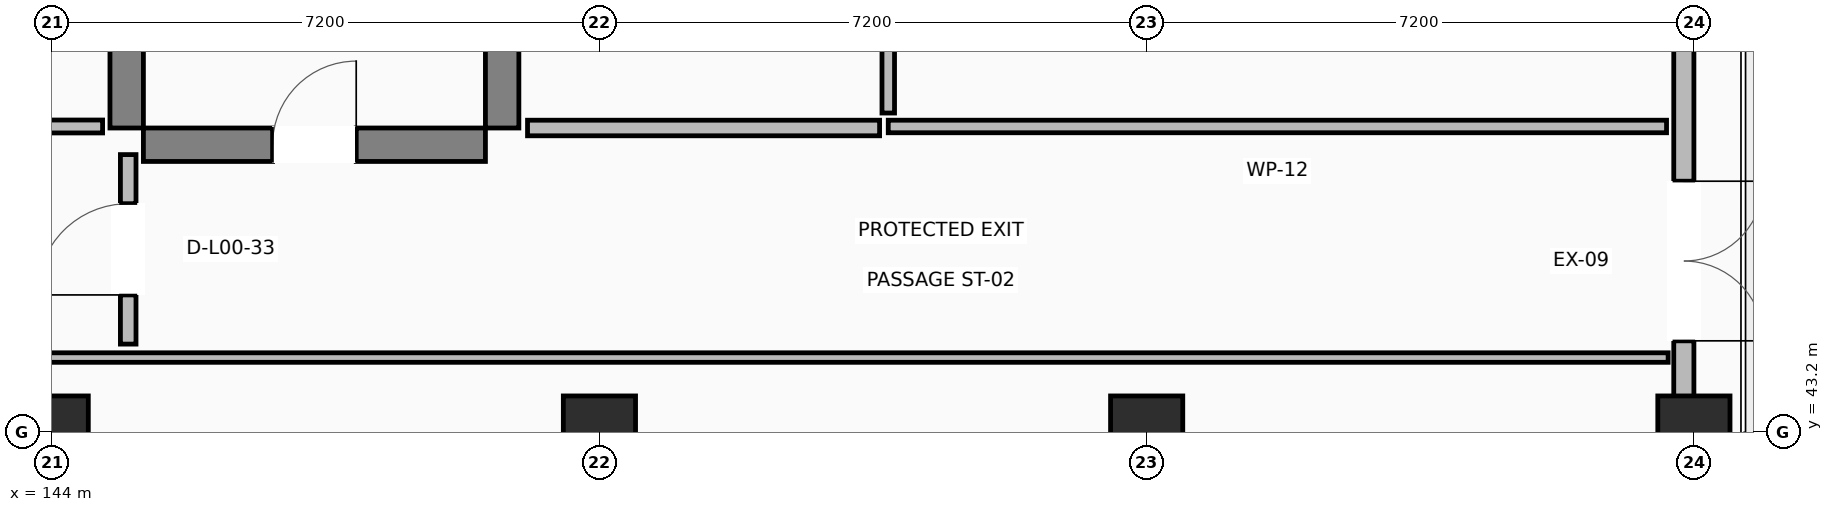
"""IFC4 building model, lengths in metres.
Left out: names, types, materials, properties, quantities, classifications, styles, units other than length and angle.
Written with IfcOpenShell. Run it as: python <this file> out.ifc"""

import sys

from ifc_helpers import new_model, si_unit, direction, frame, frame_2d, origin, origin_2d, place, context, subcontext, project, spatial, rectangle, extrude, element, fill, save


model = new_model("IFC4")
c1 = context("Model", 3, precision=1e-05, world=origin(), true_north=direction((0.0, 1.0)))
c2 = subcontext(c1, "Body", "Model", "MODEL_VIEW")
j1 = project(units=[si_unit("LENGTHUNIT", "METRE"), si_unit("PLANEANGLEUNIT", "RADIAN")], contexts=[c1])
p1 = place(None, origin())
s1 = spatial("IfcSite", under=j1, at=p1, CompositionType="ELEMENT")
p2 = place(p1, origin())
s2 = spatial("IfcBuilding", under=s1, at=p2, CompositionType="ELEMENT")
p3 = place(p2, origin())
s3 = spatial("IfcBuildingStorey", under=s2, at=p3, CompositionType="ELEMENT", Elevation=0.0)
for number, where, z_axis, x_axis in (
    (1, (144.0, 43.2, 0.0), (0.0, 0.0, 1.0), (1.0, 0.0, 0.0)),
    (2, (151.2, 43.2, 0.0), (0.0, 0.0, 1.0), (1.0, 0.0, 0.0)),
    (3, (158.4, 43.2, 0.0), (0.0, 0.0, 1.0), (1.0, 0.0, 0.0)),
    (4, (165.6, 43.2, 0.0), (0.0, 0.0, 1.0), (1.0, 0.0, 0.0)),
):
    element("IfcColumn", number, at=place(p3, frame(where, z_axis=z_axis, x_axis=x_axis)), inside=s3, PredefinedType="COLUMN", context=c2, shape_type="SweptSolid", body=[
        extrude(rectangle(XDim=0.95, YDim=0.95, at=origin_2d()), origin(), (0.0, 0.0, 1.0), 4.22),
    ])
p4 = place(p3, frame((145.2, 46.98, 0.0), z_axis=(0.0, 0.0, 1.0), x_axis=(1.0, 0.0, 0.0)))
e5 = element("IfcWall", 5, at=p4, inside=s3, PredefinedType="SHEAR", context=c2, shape_type="SweptSolid", body=[
    extrude(rectangle(XDim=4.5, YDim=0.44, at=frame_2d((2.25, 0.0))), origin(), (0.0, 0.0, 1.0), 4.22),
])
p5 = place(p4, frame((1.7, 0.0, 0.0)))
e6 = element("IfcOpeningElement", 6, at=p5, cuts=e5, PredefinedType="OPENING", context=c2, shape_type="SweptSolid", body=[
    extrude(rectangle(XDim=1.1, YDim=2.15, at=frame_2d((0.55, 1.075))), frame((0.0, 0.23, 0.0), z_axis=(0.0, -1.0, 0.0), x_axis=(1.0, 0.0, 0.0)), (0.0, 0.0, 1.0), 0.46),
])
for number, where, z_axis, x_axis in (
    (7, (144.98, 47.2, 0.0), (0.0, 0.0, 1.0), (0.0, 1.0, 0.0)),
    (8, (149.92, 47.2, 0.0), (0.0, 0.0, 1.0), (0.0, 1.0, 0.0)),
):
    element("IfcWall", number, at=place(p3, frame(where, z_axis=z_axis, x_axis=x_axis)), inside=s3, PredefinedType="SHEAR", context=c2, shape_type="SweptSolid", body=[
        extrude(rectangle(XDim=9.5, YDim=0.44, at=frame_2d((4.75, 0.0))), origin(), (0.0, 0.0, 1.0), 4.22),
    ])
p6 = place(p3, frame((165.468, 50.4, 0.0), z_axis=(0.0, 0.0, 1.0), x_axis=(0.0, -1.0, 0.0)))
e9 = element("IfcWall", 9, at=p6, inside=s3, PredefinedType="STANDARD", context=c2, shape_type="SweptSolid", body=[
    extrude(rectangle(XDim=7.2, YDim=0.265, at=frame_2d((3.6, 0.0))), origin(), (0.0, 0.0, 1.0), 2.6),
])
p7 = place(p6, frame((3.9, 0.0, 0.0)))
e10 = element("IfcOpeningElement", 10, at=p7, cuts=e9, PredefinedType="OPENING", context=c2, shape_type="SweptSolid", body=[
    extrude(rectangle(XDim=2.1, YDim=2.3, at=frame_2d((1.05, 1.15))), frame((0.0, 0.142, 0.0), z_axis=(0.0, -1.0, 0.0), x_axis=(1.0, 0.0, 0.0)), (0.0, 0.0, 1.0), 0.285),
])
p8 = place(p3, frame((165.458, 42.412, 0.0), z_axis=(0.0, 0.0, 1.0), x_axis=(0.0, 1.0, 0.0)))
e11 = element("IfcWall", 11, at=p8, inside=s3, PredefinedType="STANDARD", context=c2, shape_type="SweptSolid", body=[
    extrude(rectangle(XDim=0.788, YDim=0.285, at=frame_2d((0.394, 0.0))), origin(), (0.0, 0.0, 1.0), 2.6),
])
p9 = place(p3, frame((144.663, 47.22, 0.0), z_axis=(0.0, 0.0, 1.0), x_axis=(-1.0, 0.0, 0.0)))
e12 = element("IfcWall", 12, at=p9, inside=s3, PredefinedType="PARTITIONING", context=c2, shape_type="SweptSolid", body=[
    extrude(rectangle(XDim=10.863, YDim=0.17, at=frame_2d((5.432, 0.0))), origin(), (0.0, 0.0, 1.0), 2.6),
])
p10 = place(p9, frame((4.906, 0.0, 0.0)))
e13 = element("IfcOpeningElement", 13, at=p10, cuts=e12, PredefinedType="OPENING", context=c2, shape_type="SweptSolid", body=[
    extrude(rectangle(XDim=1.05, YDim=2.15, at=frame_2d((0.525, 1.075))), frame((0.0, 0.095, 0.0), z_axis=(0.0, -1.0, 0.0), x_axis=(1.0, 0.0, 0.0)), (0.0, 0.0, 1.0), 0.19),
])
p11 = place(p3, frame((165.24, 47.22, 0.0), z_axis=(0.0, 0.0, 1.0), x_axis=(-1.0, 0.0, 0.0)))
e14 = element("IfcWall", 14, at=p11, inside=s3, PredefinedType="PARTITIONING", context=c2, shape_type="SweptSolid", body=[
    extrude(rectangle(XDim=10.24, YDim=0.165, at=frame_2d((5.12, 0.0))), origin(), (0.0, 0.0, 1.0), 2.6),
])
p12 = place(p3, frame((155.0, 47.397, 0.0), z_axis=(0.0, 0.0, 1.0), x_axis=(0.0, 1.0, 0.0)))
e15 = element("IfcWall", 15, at=p12, inside=s3, PredefinedType="PARTITIONING", context=c2, shape_type="SweptSolid", body=[
    extrude(rectangle(XDim=10.021, YDim=0.165, at=frame_2d((5.01, 0.0))), origin(), (0.0, 0.0, 1.0), 2.6),
])
p13 = place(p12, frame((5.371, 0.0, 0.0)))
e16 = element("IfcOpeningElement", 16, at=p13, cuts=e15, PredefinedType="OPENING", context=c2, shape_type="SweptSolid", body=[
    extrude(rectangle(XDim=1.08, YDim=2.15, at=frame_2d((0.54, 1.075))), frame((0.0, 0.093, 0.0), z_axis=(0.0, -1.0, 0.0), x_axis=(1.0, 0.0, 0.0)), (0.0, 0.0, 1.0), 0.185),
])
p14 = place(p3, frame((119.62, 44.18, 0.0), z_axis=(0.0, 0.0, 1.0), x_axis=(1.0, 0.0, 0.0)))
e17 = element("IfcWall", 17, at=p14, inside=s3, PredefinedType="PARTITIONING", context=c2, shape_type="SweptSolid", body=[
    extrude(rectangle(XDim=45.641, YDim=0.125, at=frame_2d((22.82, 0.0))), origin(), (0.0, 0.0, 1.0), 2.6),
])
p15 = place(p14, frame((22.35, 0.0, 0.0)))
e18 = element("IfcOpeningElement", 18, at=p15, cuts=e17, PredefinedType="OPENING", context=c2, shape_type="SweptSolid", body=[
    extrude(rectangle(XDim=0.94, YDim=2.1, at=frame_2d((0.47, 1.05))), frame((0.0, 0.073, 0.0), z_axis=(0.0, -1.0, 0.0), x_axis=(1.0, 0.0, 0.0)), (0.0, 0.0, 1.0), 0.145),
])
p16 = place(p3, frame((145.0, 44.357, 0.0), z_axis=(0.0, 0.0, 1.0), x_axis=(0.0, 1.0, 0.0)))
e19 = element("IfcWall", 19, at=p16, inside=s3, PredefinedType="PARTITIONING", context=c2, shape_type="SweptSolid", body=[
    extrude(rectangle(XDim=2.493, YDim=0.205, at=frame_2d((1.247, 0.0))), origin(), (0.0, 0.0, 1.0), 2.6),
])
p17 = place(p16, frame((0.647, 0.0, 0.0)))
e20 = element("IfcOpeningElement", 20, at=p17, cuts=e19, PredefinedType="OPENING", context=c2, shape_type="SweptSolid", body=[
    extrude(rectangle(XDim=1.2, YDim=2.15, at=frame_2d((0.6, 1.075))), frame((0.0, 0.113, 0.0), z_axis=(0.0, -1.0, 0.0), x_axis=(1.0, 0.0, 0.0)), (0.0, 0.0, 1.0), 0.225),
])
p18 = place(p3, frame((150.254, 47.2, 0.0), z_axis=(0.0, 0.0, 1.0), x_axis=(1.0, 0.0, 0.0)))
e21 = element("IfcWall", 21, at=p18, inside=s3, PredefinedType="PARTITIONING", context=c2, shape_type="SweptSolid", body=[
    extrude(rectangle(XDim=4.632, YDim=0.205, at=frame_2d((2.316, 0.0))), origin(), (0.0, 0.0, 1.0), 2.6),
])
p19 = place(p7, origin())
e22 = element("IfcDoor", 22, at=p19, inside=s3, OperationType="DOUBLE_DOOR_SINGLE_SWING", PredefinedType="DOOR", context=c2, shape_type="SweptSolid", body=[
    extrude(rectangle(XDim=2.1, YDim=2.3, at=frame_2d((1.05, 1.15))), frame((0.0, 0.025, 0.0), z_axis=(0.0, -1.0, 0.0), x_axis=(1.0, 0.0, 0.0)), (0.0, 0.0, 1.0), 0.05),
])
fill(e10, e22)
p20 = place(p5, origin())
e23 = element("IfcDoor", 23, at=p20, inside=s3, OperationType="SINGLE_SWING_RIGHT", PredefinedType="DOOR", context=c2, shape_type="SweptSolid", body=[
    extrude(rectangle(XDim=1.1, YDim=2.15, at=frame_2d((0.55, 1.075))), frame((0.0, 0.025, 0.0), z_axis=(0.0, -1.0, 0.0), x_axis=(1.0, 0.0, 0.0)), (0.0, 0.0, 1.0), 0.05),
])
fill(e6, e23)
p21 = place(p17, origin())
e24 = element("IfcDoor", 24, at=p21, inside=s3, OperationType="SINGLE_SWING_LEFT", PredefinedType="DOOR", context=c2, shape_type="SweptSolid", body=[
    extrude(rectangle(XDim=1.2, YDim=2.15, at=frame_2d((0.6, 1.075))), frame((0.0, 0.025, 0.0), z_axis=(0.0, -1.0, 0.0), x_axis=(1.0, 0.0, 0.0)), (0.0, 0.0, 1.0), 0.05),
])
fill(e20, e24)
save(model, sys.argv[1])
